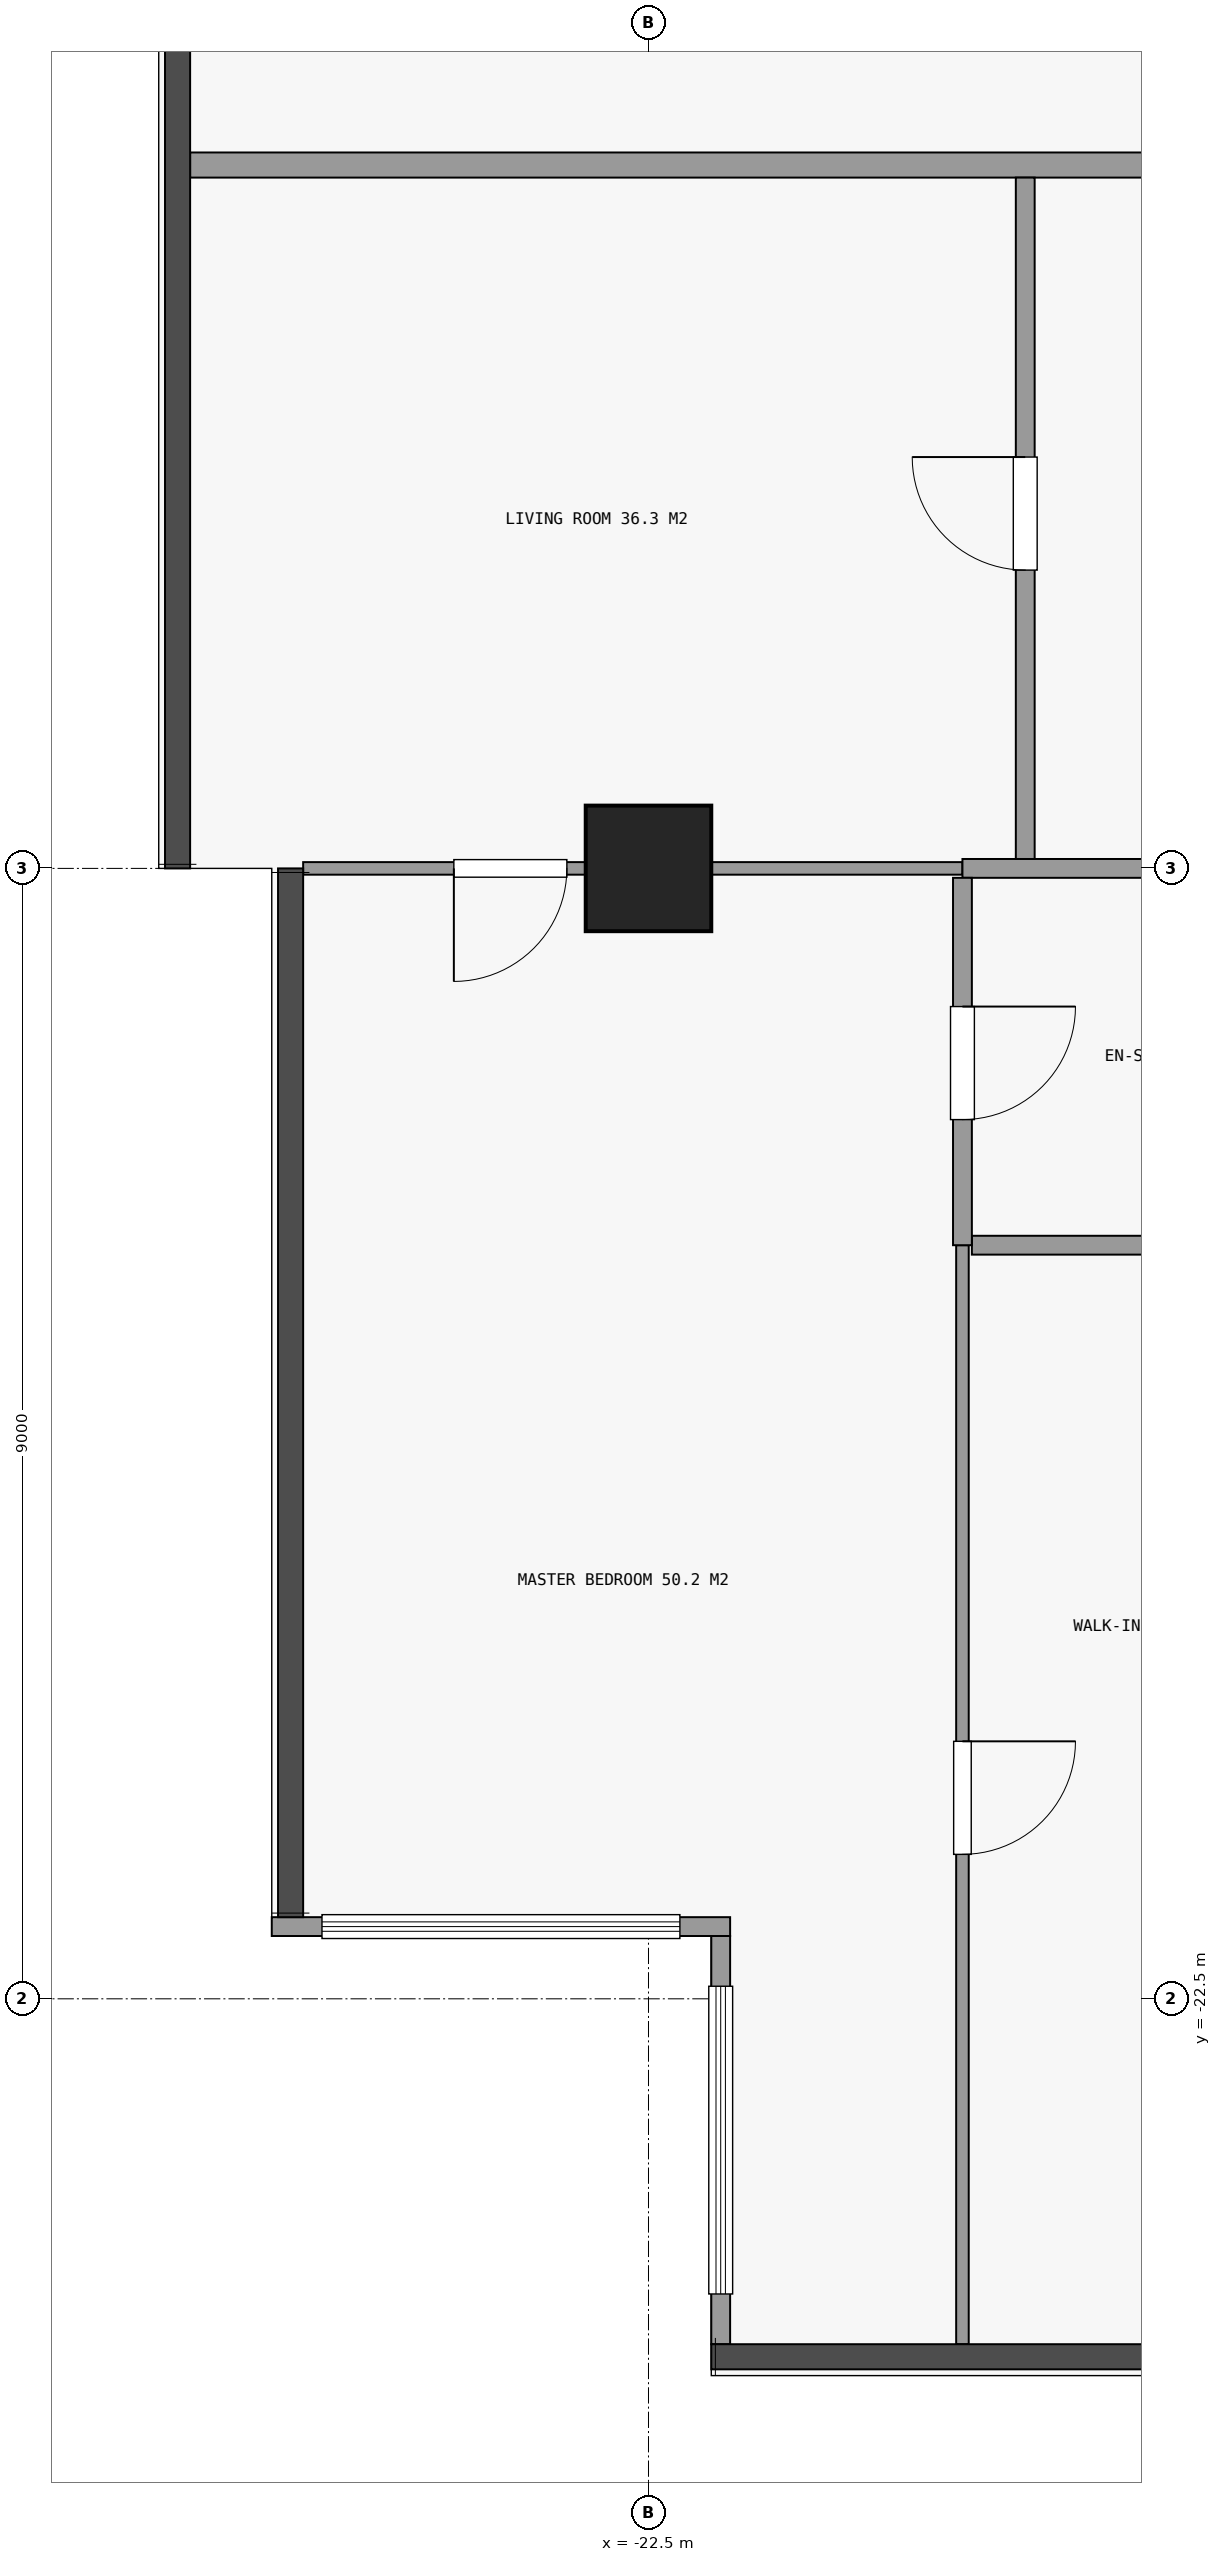
"""IFC4 building model, lengths in metres.
Left out: names, types, materials, properties, quantities, classifications, styles, units other than length and angle.
Written with IfcOpenShell. Run it as: python <this file> out.ifc"""

import sys

from ifc_helpers import new_model, si_unit, direction, frame, frame_2d, origin, origin_2d, place, context, subcontext, project, spatial, rectangle, extrude, element, fill, save


model = new_model("IFC4")
c1 = context("Model", 3, precision=1e-05, world=origin(), true_north=direction((0.0, 1.0)))
c2 = subcontext(c1, "Body", "Model", "MODEL_VIEW")
j1 = project(units=[si_unit("LENGTHUNIT", "METRE"), si_unit("PLANEANGLEUNIT", "RADIAN")], contexts=[c1])
p1 = place(None, origin())
s1 = spatial("IfcSite", under=j1, at=p1, CompositionType="ELEMENT")
p2 = place(p1, origin())
s2 = spatial("IfcBuilding", under=s1, at=p2, CompositionType="ELEMENT")
p3 = place(p2, frame((0.0, 0.0, 113.5)))
s3 = spatial("IfcBuildingStorey", under=s2, at=p3, CompositionType="ELEMENT", Elevation=113.5)
p4 = place(p3, frame((-22.5, -13.5, 0.0), z_axis=(0.0, 0.0, 1.0), x_axis=(1.0, 0.0, 0.0)))
e1 = element("IfcColumn", 1, at=p4, inside=s3, PredefinedType="COLUMN", context=c2, shape_type="SweptSolid", body=[
    extrude(rectangle(XDim=1.0, YDim=1.0, at=origin_2d()), origin(), (0.0, 0.0, 1.0), 3.6),
])
p5 = place(p3, frame((-21.925, -25.25, 0.0), z_axis=(0.0, 0.0, 1.0), x_axis=(0.0, 1.0, 0.0)))
e2 = element("IfcWall", 2, at=p5, inside=s3, PredefinedType="SOLIDWALL", context=c2, shape_type="SweptSolid", body=[
    extrude(rectangle(XDim=3.25, YDim=0.15, at=frame_2d((1.625, 0.0))), origin(), (0.0, 0.0, 1.0), 3.3),
])
p6 = place(p5, frame((0.4, 0.0, 0.9)))
e3 = element("IfcOpeningElement", 3, at=p6, cuts=e2, PredefinedType="OPENING", context=c2, shape_type="SweptSolid", body=[
    extrude(rectangle(XDim=2.45, YDim=2.4, at=frame_2d((1.225, 1.2))), frame((0.0, 0.085, 0.0), z_axis=(0.0, -1.0, 0.0), x_axis=(1.0, 0.0, 0.0)), (0.0, 0.0, 1.0), 0.17),
])
p7 = place(p3, frame((-21.85, -21.925, 0.0), z_axis=(0.0, 0.0, 1.0), x_axis=(-1.0, 0.0, 0.0)))
e4 = element("IfcWall", 4, at=p7, inside=s3, PredefinedType="SOLIDWALL", context=c2, shape_type="SweptSolid", body=[
    extrude(rectangle(XDim=3.65, YDim=0.15, at=frame_2d((1.825, 0.0))), origin(), (0.0, 0.0, 1.0), 3.3),
])
p8 = place(p7, frame((0.4, 0.0, 0.9)))
e5 = element("IfcOpeningElement", 5, at=p8, cuts=e4, PredefinedType="OPENING", context=c2, shape_type="SweptSolid", body=[
    extrude(rectangle(XDim=2.85, YDim=2.4, at=frame_2d((1.425, 1.2))), frame((0.0, 0.085, 0.0), z_axis=(0.0, -1.0, 0.0), x_axis=(1.0, 0.0, 0.0)), (0.0, 0.0, 1.0), 0.17),
])
p9 = place(p3, frame((-19.925, -16.5, 0.0), z_axis=(0.0, 0.0, 1.0), x_axis=(1.0, 0.0, 0.0)))
e6 = element("IfcWall", 6, at=p9, inside=s3, PredefinedType="PARTITIONING", context=c2, shape_type="SweptSolid", body=[
    extrude(rectangle(XDim=3.45, YDim=0.15, at=frame_2d((1.725, 0.0))), origin(), (0.0, 0.0, 1.0), 3.3),
])
p10 = place(p3, frame((-25.25, -13.5, 0.0), z_axis=(0.0, 0.0, 1.0), x_axis=(1.0, 0.0, 0.0)))
e7 = element("IfcWall", 7, at=p10, inside=s3, PredefinedType="PARTITIONING", context=c2, shape_type="SweptSolid", body=[
    extrude(rectangle(XDim=5.25, YDim=0.1, at=frame_2d((2.625, 0.0))), origin(), (0.0, 0.0, 1.0), 3.3),
])
p11 = place(p10, frame((1.2, 0.0, 0.0)))
e8 = element("IfcOpeningElement", 8, at=p11, cuts=e7, PredefinedType="OPENING", context=c2, shape_type="SweptSolid", body=[
    extrude(rectangle(XDim=0.9, YDim=2.1, at=frame_2d((0.45, 1.05))), frame((0.0, 0.06, 0.0), z_axis=(0.0, -1.0, 0.0), x_axis=(1.0, 0.0, 0.0)), (0.0, 0.0, 1.0), 0.12),
])
p12 = place(p3, frame((-20.0, -13.5, 0.0), z_axis=(0.0, 0.0, 1.0), x_axis=(1.0, 0.0, 0.0)))
e9 = element("IfcWall", 9, at=p12, inside=s3, PredefinedType="PARTITIONING", context=c2, shape_type="SweptSolid", body=[
    extrude(rectangle(XDim=3.525, YDim=0.15, at=frame_2d((1.762, 0.0))), origin(), (0.0, 0.0, 1.0), 3.3),
])
p13 = place(p3, frame((-26.15, -7.9, 0.0), z_axis=(0.0, 0.0, 1.0), x_axis=(1.0, 0.0, 0.0)))
e10 = element("IfcWall", 10, at=p13, inside=s3, PredefinedType="PARTITIONING", context=c2, shape_type="SweptSolid", body=[
    extrude(rectangle(XDim=12.75, YDim=0.2, at=frame_2d((6.375, 0.0))), origin(), (0.0, 0.0, 1.0), 3.3),
])
p14 = place(p13, frame((10.75, 0.0, 0.0)))
e11 = element("IfcOpeningElement", 11, at=p14, cuts=e10, PredefinedType="OPENING", context=c2, shape_type="SweptSolid", body=[
    extrude(rectangle(XDim=1.0, YDim=2.1, at=frame_2d((0.5, 1.05))), frame((0.0, 0.11, 0.0), z_axis=(0.0, -1.0, 0.0), x_axis=(1.0, 0.0, 0.0)), (0.0, 0.0, 1.0), 0.22),
])
p15 = place(p3, frame((-20.0, -25.25, 0.0), z_axis=(0.0, 0.0, 1.0), x_axis=(0.0, 1.0, 0.0)))
e12 = element("IfcWall", 12, at=p15, inside=s3, PredefinedType="PARTITIONING", context=c2, shape_type="SweptSolid", body=[
    extrude(rectangle(XDim=8.75, YDim=0.1, at=frame_2d((4.375, 0.0))), origin(), (0.0, 0.0, 1.0), 3.3),
])
p16 = place(p15, frame((3.9, 0.0, 0.0)))
e13 = element("IfcOpeningElement", 13, at=p16, cuts=e12, PredefinedType="OPENING", context=c2, shape_type="SweptSolid", body=[
    extrude(rectangle(XDim=0.9, YDim=2.1, at=frame_2d((0.45, 1.05))), frame((0.0, 0.06, 0.0), z_axis=(0.0, -1.0, 0.0), x_axis=(1.0, 0.0, 0.0)), (0.0, 0.0, 1.0), 0.12),
])
p17 = place(p3, frame((-20.0, -16.5, 0.0), z_axis=(0.0, 0.0, 1.0), x_axis=(0.0, 1.0, 0.0)))
e14 = element("IfcWall", 14, at=p17, inside=s3, PredefinedType="PARTITIONING", context=c2, shape_type="SweptSolid", body=[
    extrude(rectangle(XDim=2.925, YDim=0.15, at=frame_2d((1.462, 0.0))), origin(), (0.0, 0.0, 1.0), 3.3),
])
p18 = place(p17, frame((1.0, 0.0, 0.0)))
e15 = element("IfcOpeningElement", 15, at=p18, cuts=e14, PredefinedType="OPENING", context=c2, shape_type="SweptSolid", body=[
    extrude(rectangle(XDim=0.9, YDim=2.1, at=frame_2d((0.45, 1.05))), frame((0.0, 0.085, 0.0), z_axis=(0.0, -1.0, 0.0), x_axis=(1.0, 0.0, 0.0)), (0.0, 0.0, 1.0), 0.17),
])
p19 = place(p3, frame((-19.5, -13.425, 0.0), z_axis=(0.0, 0.0, 1.0), x_axis=(0.0, 1.0, 0.0)))
e16 = element("IfcWall", 16, at=p19, inside=s3, PredefinedType="PARTITIONING", context=c2, shape_type="SweptSolid", body=[
    extrude(rectangle(XDim=5.425, YDim=0.15, at=frame_2d((2.712, 0.0))), origin(), (0.0, 0.0, 1.0), 3.3),
])
p20 = place(p19, frame((2.3, 0.0, 0.0)))
e17 = element("IfcOpeningElement", 17, at=p20, cuts=e16, PredefinedType="OPENING", context=c2, shape_type="SweptSolid", body=[
    extrude(rectangle(XDim=0.9, YDim=2.1, at=frame_2d((0.45, 1.05))), frame((0.0, 0.085, 0.0), z_axis=(0.0, -1.0, 0.0), x_axis=(1.0, 0.0, 0.0)), (0.0, 0.0, 1.0), 0.17),
])
p21 = place(p6, origin())
e18 = element("IfcWindow", 18, at=p21, inside=s3, PartitioningType="SINGLE_PANEL", PredefinedType="WINDOW", context=c2, shape_type="SweptSolid", body=[
    extrude(rectangle(XDim=2.45, YDim=2.4, at=frame_2d((1.225, 1.2))), frame((0.0, 0.03, 0.0), z_axis=(0.0, -1.0, 0.0), x_axis=(1.0, 0.0, 0.0)), (0.0, 0.0, 1.0), 0.06),
])
fill(e3, e18)
p22 = place(p8, origin())
e19 = element("IfcWindow", 19, at=p22, inside=s3, PartitioningType="SINGLE_PANEL", PredefinedType="WINDOW", context=c2, shape_type="SweptSolid", body=[
    extrude(rectangle(XDim=2.85, YDim=2.4, at=frame_2d((1.425, 1.2))), frame((0.0, 0.03, 0.0), z_axis=(0.0, -1.0, 0.0), x_axis=(1.0, 0.0, 0.0)), (0.0, 0.0, 1.0), 0.06),
])
fill(e5, e19)
p23 = place(p11, origin())
e20 = element("IfcDoor", 20, at=p23, inside=s3, OperationType="SINGLE_SWING_LEFT", PredefinedType="DOOR", context=c2, shape_type="SweptSolid", body=[
    extrude(rectangle(XDim=0.9, YDim=2.1, at=frame_2d((0.45, 1.05))), frame((0.0, 0.025, 0.0), z_axis=(0.0, -1.0, 0.0), x_axis=(1.0, 0.0, 0.0)), (0.0, 0.0, 1.0), 0.05),
])
fill(e8, e20)
p24 = place(p16, origin())
e21 = element("IfcDoor", 21, at=p24, inside=s3, OperationType="SINGLE_SWING_RIGHT", PredefinedType="DOOR", context=c2, shape_type="SweptSolid", body=[
    extrude(rectangle(XDim=0.9, YDim=2.1, at=frame_2d((0.45, 1.05))), frame((0.0, 0.025, 0.0), z_axis=(0.0, -1.0, 0.0), x_axis=(1.0, 0.0, 0.0)), (0.0, 0.0, 1.0), 0.05),
])
fill(e13, e21)
p25 = place(p18, origin())
e22 = element("IfcDoor", 22, at=p25, inside=s3, OperationType="SINGLE_SWING_RIGHT", PredefinedType="DOOR", context=c2, shape_type="SweptSolid", body=[
    extrude(rectangle(XDim=0.9, YDim=2.1, at=frame_2d((0.45, 1.05))), frame((0.0, 0.025, 0.0), z_axis=(0.0, -1.0, 0.0), x_axis=(1.0, 0.0, 0.0)), (0.0, 0.0, 1.0), 0.05),
])
fill(e15, e22)
p26 = place(p20, origin())
e23 = element("IfcDoor", 23, at=p26, inside=s3, OperationType="SINGLE_SWING_LEFT", PredefinedType="DOOR", context=c2, shape_type="SweptSolid", body=[
    extrude(rectangle(XDim=0.9, YDim=2.1, at=frame_2d((0.45, 1.05))), frame((0.0, 0.025, 0.0), z_axis=(0.0, -1.0, 0.0), x_axis=(1.0, 0.0, 0.0)), (0.0, 0.0, 1.0), 0.05),
])
fill(e17, e23)
save(model, sys.argv[1])
